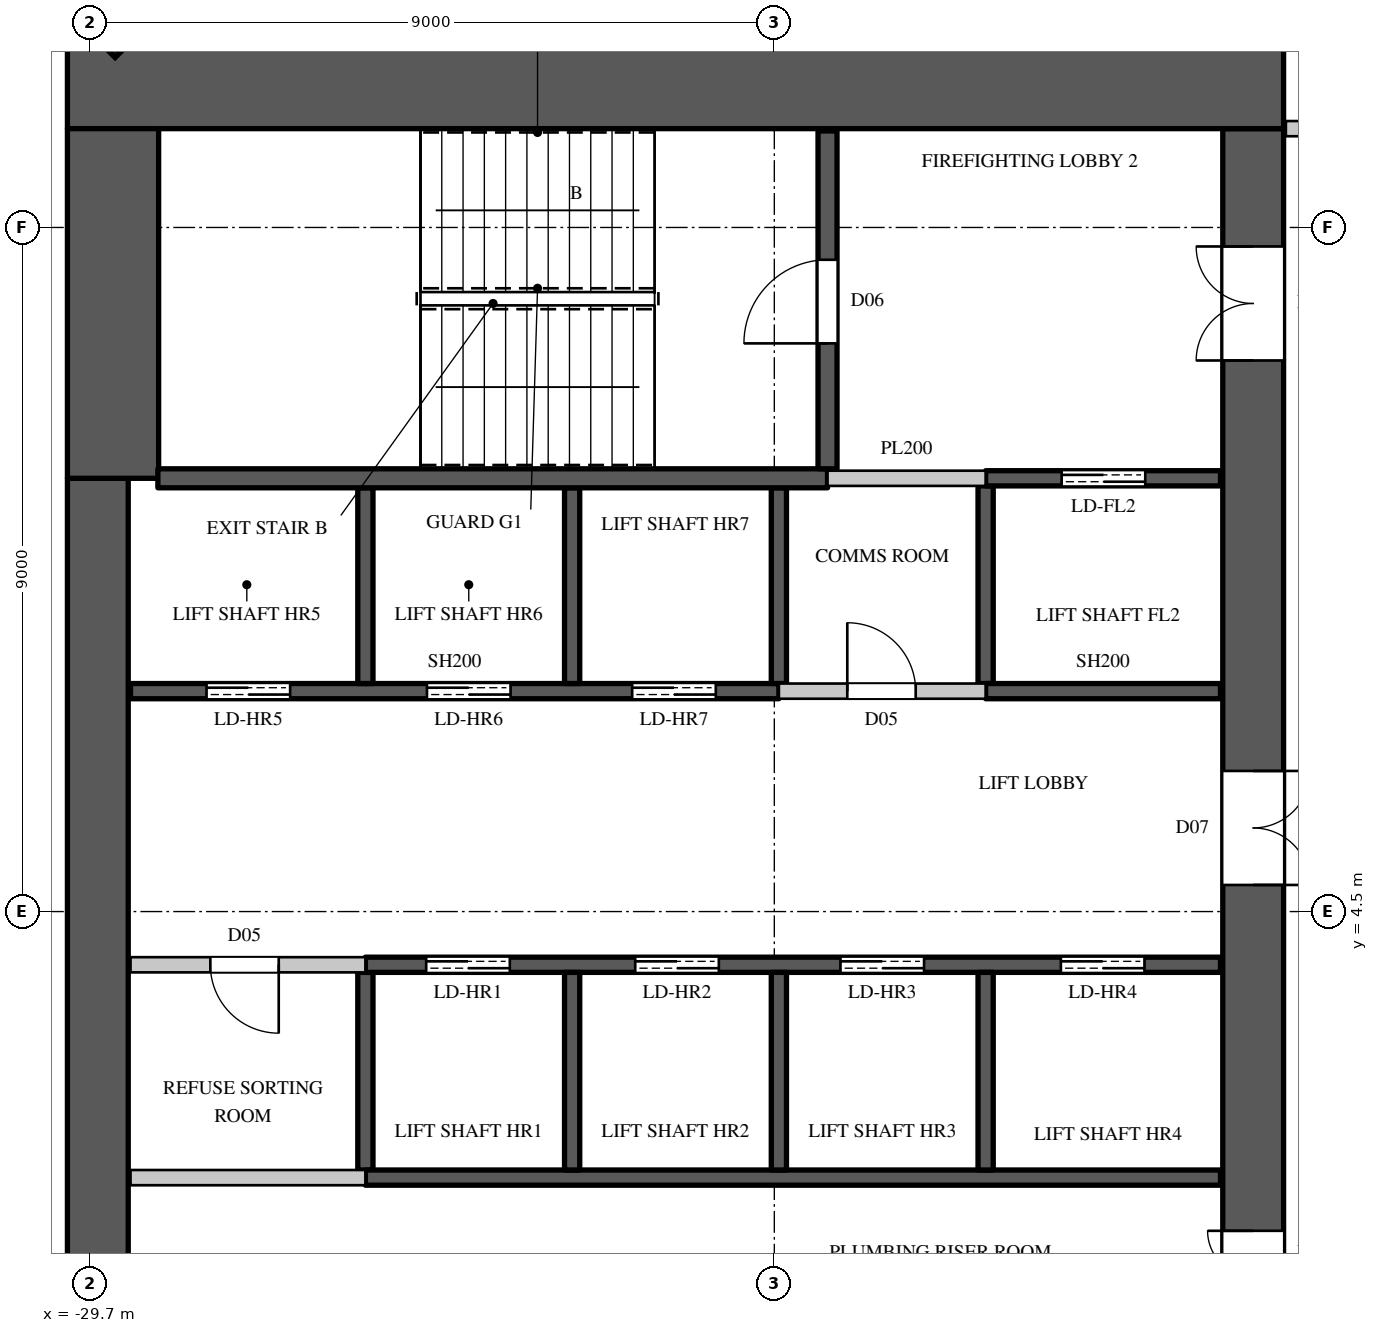
"""IFC4 building model, lengths in metres.
Left out: names, types, materials, properties, quantities, classifications, styles, units other than length and angle.
Written with IfcOpenShell. Run it as: python <this file> out.ifc"""

import sys

from ifc_helpers import new_model, si_unit, direction, frame, frame_2d, origin, origin_2d, place, context, subcontext, project, spatial, rectangle, extrude, element, fill, save


model = new_model("IFC4")
c1 = context("Model", 3, precision=1e-05, world=origin(), true_north=direction((0.0, 1.0)))
c2 = subcontext(c1, "Body", "Model", "MODEL_VIEW")
j1 = project(units=[si_unit("LENGTHUNIT", "METRE"), si_unit("PLANEANGLEUNIT", "RADIAN")], contexts=[c1])
p1 = place(None, origin())
s1 = spatial("IfcSite", under=j1, at=p1, CompositionType="ELEMENT")
p2 = place(p1, origin())
s2 = spatial("IfcBuilding", under=s1, at=p2, CompositionType="ELEMENT")
p3 = place(p2, frame((0.0, 0.0, 172.8)))
s3 = spatial("IfcBuildingStorey", under=s2, at=p3, CompositionType="ELEMENT", Elevation=172.8)
p4 = place(p3, frame((-29.443, 16.443, 0.0), z_axis=(0.0, 0.0, 1.0), x_axis=(-0.707106781187, -0.707106781187, 0.0)))
e1 = element("IfcColumn", 1, at=p4, inside=s3, PredefinedType="COLUMN", context=c2, shape_type="SweptSolid", body=[
    extrude(rectangle(XDim=0.9, YDim=1.1, at=origin_2d()), origin(), (0.0, 0.0, 1.0), 4.1),
])
p5 = place(p3, frame((-30.0, 15.4, 0.0), z_axis=(0.0, 0.0, 1.0), x_axis=(1.0, 0.0, 0.0)))
e2 = element("IfcWall", 2, at=p5, inside=s3, PredefinedType="SHEAR", context=c2, shape_type="SweptSolid", body=[
    extrude(rectangle(XDim=16.0, YDim=1.2, at=frame_2d((8.0, 0.0))), origin(), (0.0, 0.0, 1.0), 4.1),
])
p6 = place(p3, frame((-14.4, -14.8, 0.0), z_axis=(0.0, 0.0, 1.0), x_axis=(0.0, 1.0, 0.0)))
e3 = element("IfcWall", 3, at=p6, inside=s3, PredefinedType="SHEAR", context=c2, shape_type="SweptSolid", body=[
    extrude(rectangle(XDim=29.6, YDim=0.8, at=frame_2d((14.8, 0.0))), origin(), (0.0, 0.0, 1.0), 4.1),
])
p7 = place(p6, frame((1.55, 0.0, 0.0)))
e4 = element("IfcOpeningElement", 4, at=p7, cuts=e3, PredefinedType="OPENING", context=c2, shape_type="SweptSolid", body=[
    extrude(rectangle(XDim=1.5, YDim=2.4, at=frame_2d((0.75, 1.2))), frame((0.0, 0.41, 0.0), z_axis=(0.0, -1.0, 0.0), x_axis=(1.0, 0.0, 0.0)), (0.0, 0.0, 1.0), 0.82),
])
p8 = place(p6, frame((26.55, 0.0, 0.0)))
e5 = element("IfcOpeningElement", 5, at=p8, cuts=e3, PredefinedType="OPENING", context=c2, shape_type="SweptSolid", body=[
    extrude(rectangle(XDim=1.5, YDim=2.4, at=frame_2d((0.75, 1.2))), frame((0.0, 0.41, 0.0), z_axis=(0.0, -1.0, 0.0), x_axis=(1.0, 0.0, 0.0)), (0.0, 0.0, 1.0), 0.82),
])
p9 = place(p6, frame((8.45, 0.0, 0.0)))
e6 = element("IfcOpeningElement", 6, at=p9, cuts=e3, PredefinedType="OPENING", context=c2, shape_type="SweptSolid", body=[
    extrude(rectangle(XDim=1.5, YDim=2.4, at=frame_2d((0.75, 1.2))), frame((0.0, 0.41, 0.0), z_axis=(0.0, -1.0, 0.0), x_axis=(1.0, 0.0, 0.0)), (0.0, 0.0, 1.0), 0.82),
])
p10 = place(p6, frame((19.65, 0.0, 0.0)))
e7 = element("IfcOpeningElement", 7, at=p10, cuts=e3, PredefinedType="OPENING", context=c2, shape_type="SweptSolid", body=[
    extrude(rectangle(XDim=1.5, YDim=2.4, at=frame_2d((0.75, 1.2))), frame((0.0, 0.41, 0.0), z_axis=(0.0, -1.0, 0.0), x_axis=(1.0, 0.0, 0.0)), (0.0, 0.0, 1.0), 0.82),
])
p11 = place(p6, frame((14.5, 0.0, 0.0)))
e8 = element("IfcOpeningElement", 8, at=p11, cuts=e3, PredefinedType="OPENING", context=c2, shape_type="SweptSolid", body=[
    extrude(rectangle(XDim=0.6, YDim=2.0, at=frame_2d((0.3, 1.0))), frame((0.0, 0.41, 0.0), z_axis=(0.0, -1.0, 0.0), x_axis=(1.0, 0.0, 0.0)), (0.0, 0.0, 1.0), 0.82),
])
p12 = place(p3, frame((-29.6, -10.2, 0.0), z_axis=(0.0, 0.0, 1.0), x_axis=(0.0, 1.0, 0.0)))
e9 = element("IfcWall", 9, at=p12, inside=s3, PredefinedType="SHEAR", context=c2, shape_type="SweptSolid", body=[
    extrude(rectangle(XDim=20.4, YDim=0.8, at=frame_2d((10.2, 0.0))), origin(), (0.0, 0.0, 1.0), 4.1),
])
p13 = place(p3, frame((-29.4, 10.2, 0.0), z_axis=(0.0, 0.0, 1.0), x_axis=(0.0, 1.0, 0.0)))
e10 = element("IfcWall", 10, at=p13, inside=s3, PredefinedType="SHEAR", context=c2, shape_type="SweptSolid", body=[
    extrude(rectangle(XDim=4.6, YDim=1.2, at=frame_2d((2.3, 0.0))), origin(), (0.0, 0.0, 1.0), 4.1),
])
p14 = place(p3, frame((-29.17, 3.8, 0.0), z_axis=(0.0, 0.0, 1.0), x_axis=(1.0, 0.0, 0.0)))
e11 = element("IfcWall", 11, at=p14, inside=s3, PredefinedType="PARTITIONING", context=c2, shape_type="SweptSolid", body=[
    extrude(rectangle(XDim=3.09, YDim=0.2, at=frame_2d((1.545, 0.0))), origin(), (0.0, 0.0, 1.0), 3.8),
])
p15 = place(p14, frame((1.05, 0.0, 0.0)))
e12 = element("IfcOpeningElement", 12, at=p15, cuts=e11, PredefinedType="OPENING", context=c2, shape_type="SweptSolid", body=[
    extrude(rectangle(XDim=0.9, YDim=2.2, at=frame_2d((0.45, 1.1))), frame((0.0, 0.11, 0.0), z_axis=(0.0, -1.0, 0.0), x_axis=(1.0, 0.0, 0.0)), (0.0, 0.0, 1.0), 0.22),
])
p16 = place(p3, frame((-13.97, 14.8, 0.0), z_axis=(0.0, 0.0, 1.0), x_axis=(1.0, 0.0, 0.0)))
e13 = element("IfcWall", 13, at=p16, inside=s3, PredefinedType="PARTITIONING", context=c2, shape_type="SweptSolid", body=[
    extrude(rectangle(XDim=2.87, YDim=0.2, at=frame_2d((1.435, 0.0))), origin(), (0.0, 0.0, 1.0), 3.8),
])
p17 = place(p3, frame((-29.17, 1.0, 0.0), z_axis=(0.0, 0.0, 1.0), x_axis=(1.0, 0.0, 0.0)))
e14 = element("IfcWall", 14, at=p17, inside=s3, PredefinedType="PARTITIONING", context=c2, shape_type="SweptSolid", body=[
    extrude(rectangle(XDim=3.09, YDim=0.2, at=frame_2d((1.545, 0.0))), origin(), (0.0, 0.0, 1.0), 3.8),
])
p18 = place(p3, frame((-20.64, 7.4, 0.0), z_axis=(0.0, 0.0, 1.0), x_axis=(1.0, 0.0, 0.0)))
e15 = element("IfcWall", 15, at=p18, inside=s3, PredefinedType="PARTITIONING", context=c2, shape_type="SweptSolid", body=[
    extrude(rectangle(XDim=2.72, YDim=0.2, at=frame_2d((1.36, 0.0))), origin(), (0.0, 0.0, 1.0), 3.8),
])
p19 = place(p18, frame((0.9, 0.0, 0.0)))
e16 = element("IfcOpeningElement", 16, at=p19, cuts=e15, PredefinedType="OPENING", context=c2, shape_type="SweptSolid", body=[
    extrude(rectangle(XDim=0.9, YDim=2.2, at=frame_2d((0.45, 1.1))), frame((0.0, 0.11, 0.0), z_axis=(0.0, -1.0, 0.0), x_axis=(1.0, 0.0, 0.0)), (0.0, 0.0, 1.0), 0.22),
])
p20 = place(p3, frame((-20.0, 10.2, 0.0), z_axis=(0.0, 0.0, 1.0), x_axis=(1.0, 0.0, 0.0)))
e17 = element("IfcWall", 17, at=p20, inside=s3, PredefinedType="PARTITIONING", context=c2, shape_type="SweptSolid", body=[
    extrude(rectangle(XDim=2.08, YDim=0.2, at=frame_2d((1.04, 0.0))), origin(), (0.0, 0.0, 1.0), 3.8),
])
p21 = place(p3, frame((-29.17, 7.4, 0.0), z_axis=(0.0, 0.0, 1.0), x_axis=(1.0, 0.0, 0.0)))
e18 = element("IfcWall", 18, at=p21, inside=s3, PredefinedType="SHEAR", context=c2, shape_type="SweptSolid", body=[
    extrude(rectangle(XDim=8.53, YDim=0.2, at=frame_2d((4.265, 0.0))), origin(), (0.0, 0.0, 1.0), 3.8),
])
p22 = place(p21, frame((1.0, 0.0, 0.0)))
e19 = element("IfcOpeningElement", 19, at=p22, cuts=e18, PredefinedType="OPENING", context=c2, shape_type="SweptSolid", body=[
    extrude(rectangle(XDim=1.1, YDim=2.2, at=frame_2d((0.55, 1.1))), frame((0.0, 0.11, 0.0), z_axis=(0.0, -1.0, 0.0), x_axis=(1.0, 0.0, 0.0)), (0.0, 0.0, 1.0), 0.22),
])
p23 = place(p21, frame((3.9, 0.0, 0.0)))
e20 = element("IfcOpeningElement", 20, at=p23, cuts=e18, PredefinedType="OPENING", context=c2, shape_type="SweptSolid", body=[
    extrude(rectangle(XDim=1.1, YDim=2.2, at=frame_2d((0.55, 1.1))), frame((0.0, 0.11, 0.0), z_axis=(0.0, -1.0, 0.0), x_axis=(1.0, 0.0, 0.0)), (0.0, 0.0, 1.0), 0.22),
])
p24 = place(p21, frame((6.6, 0.0, 0.0)))
e21 = element("IfcOpeningElement", 21, at=p24, cuts=e18, PredefinedType="OPENING", context=c2, shape_type="SweptSolid", body=[
    extrude(rectangle(XDim=1.1, YDim=2.2, at=frame_2d((0.55, 1.1))), frame((0.0, 0.11, 0.0), z_axis=(0.0, -1.0, 0.0), x_axis=(1.0, 0.0, 0.0)), (0.0, 0.0, 1.0), 0.22),
])
p25 = place(p3, frame((-26.08, 1.1, 0.0), z_axis=(0.0, 0.0, 1.0), x_axis=(0.0, 1.0, 0.0)))
e22 = element("IfcWall", 22, at=p25, inside=s3, PredefinedType="SHEAR", context=c2, shape_type="SweptSolid", body=[
    extrude(rectangle(XDim=2.6, YDim=0.2, at=frame_2d((1.3, 0.0))), origin(), (0.0, 0.0, 1.0), 3.8),
])
p26 = place(p3, frame((-26.08, 1.0, 0.0), z_axis=(0.0, 0.0, 1.0), x_axis=(1.0, 0.0, 0.0)))
e23 = element("IfcWall", 23, at=p26, inside=s3, PredefinedType="SHEAR", context=c2, shape_type="SweptSolid", body=[
    extrude(rectangle(XDim=11.25, YDim=0.2, at=frame_2d((5.625, 0.0))), origin(), (0.0, 0.0, 1.0), 3.8),
])
p27 = place(p3, frame((-26.08, 3.8, 0.0), z_axis=(0.0, 0.0, 1.0), x_axis=(1.0, 0.0, 0.0)))
e24 = element("IfcWall", 24, at=p27, inside=s3, PredefinedType="SHEAR", context=c2, shape_type="SweptSolid", body=[
    extrude(rectangle(XDim=11.25, YDim=0.2, at=frame_2d((5.625, 0.0))), origin(), (0.0, 0.0, 1.0), 3.8),
])
p28 = place(p27, frame((0.8, 0.0, 0.0)))
e25 = element("IfcOpeningElement", 25, at=p28, cuts=e24, PredefinedType="OPENING", context=c2, shape_type="SweptSolid", body=[
    extrude(rectangle(XDim=1.1, YDim=2.2, at=frame_2d((0.55, 1.1))), frame((0.0, 0.11, 0.0), z_axis=(0.0, -1.0, 0.0), x_axis=(1.0, 0.0, 0.0)), (0.0, 0.0, 1.0), 0.22),
])
p29 = place(p27, frame((3.55, 0.0, 0.0)))
e26 = element("IfcOpeningElement", 26, at=p29, cuts=e24, PredefinedType="OPENING", context=c2, shape_type="SweptSolid", body=[
    extrude(rectangle(XDim=1.1, YDim=2.2, at=frame_2d((0.55, 1.1))), frame((0.0, 0.11, 0.0), z_axis=(0.0, -1.0, 0.0), x_axis=(1.0, 0.0, 0.0)), (0.0, 0.0, 1.0), 0.22),
])
p30 = place(p27, frame((6.25, 0.0, 0.0)))
e27 = element("IfcOpeningElement", 27, at=p30, cuts=e24, PredefinedType="OPENING", context=c2, shape_type="SweptSolid", body=[
    extrude(rectangle(XDim=1.1, YDim=2.2, at=frame_2d((0.55, 1.1))), frame((0.0, 0.11, 0.0), z_axis=(0.0, -1.0, 0.0), x_axis=(1.0, 0.0, 0.0)), (0.0, 0.0, 1.0), 0.22),
])
p31 = place(p27, frame((9.15, 0.0, 0.0)))
e28 = element("IfcOpeningElement", 28, at=p31, cuts=e24, PredefinedType="OPENING", context=c2, shape_type="SweptSolid", body=[
    extrude(rectangle(XDim=1.1, YDim=2.2, at=frame_2d((0.55, 1.1))), frame((0.0, 0.11, 0.0), z_axis=(0.0, -1.0, 0.0), x_axis=(1.0, 0.0, 0.0)), (0.0, 0.0, 1.0), 0.22),
])
p32 = place(p3, frame((-26.08, 7.5, 0.0), z_axis=(0.0, 0.0, 1.0), x_axis=(0.0, 1.0, 0.0)))
e29 = element("IfcWall", 29, at=p32, inside=s3, PredefinedType="SHEAR", context=c2, shape_type="SweptSolid", body=[
    extrude(rectangle(XDim=2.575, YDim=0.2, at=frame_2d((1.288, 0.0))), origin(), (0.0, 0.0, 1.0), 4.1),
])
p33 = place(p3, frame((-23.36, 1.1, 0.0), z_axis=(0.0, 0.0, 1.0), x_axis=(0.0, 1.0, 0.0)))
e30 = element("IfcWall", 30, at=p33, inside=s3, PredefinedType="SHEAR", context=c2, shape_type="SweptSolid", body=[
    extrude(rectangle(XDim=2.6, YDim=0.2, at=frame_2d((1.3, 0.0))), origin(), (0.0, 0.0, 1.0), 4.1),
])
p34 = place(p3, frame((-23.36, 7.5, 0.0), z_axis=(0.0, 0.0, 1.0), x_axis=(0.0, 1.0, 0.0)))
e31 = element("IfcWall", 31, at=p34, inside=s3, PredefinedType="SHEAR", context=c2, shape_type="SweptSolid", body=[
    extrude(rectangle(XDim=2.575, YDim=0.2, at=frame_2d((1.288, 0.0))), origin(), (0.0, 0.0, 1.0), 4.1),
])
p35 = place(p3, frame((-20.64, 1.1, 0.0), z_axis=(0.0, 0.0, 1.0), x_axis=(0.0, 1.0, 0.0)))
e32 = element("IfcWall", 32, at=p35, inside=s3, PredefinedType="SHEAR", context=c2, shape_type="SweptSolid", body=[
    extrude(rectangle(XDim=2.6, YDim=0.2, at=frame_2d((1.3, 0.0))), origin(), (0.0, 0.0, 1.0), 4.1),
])
p36 = place(p3, frame((-20.64, 7.5, 0.0), z_axis=(0.0, 0.0, 1.0), x_axis=(0.0, 1.0, 0.0)))
e33 = element("IfcWall", 33, at=p36, inside=s3, PredefinedType="SHEAR", context=c2, shape_type="SweptSolid", body=[
    extrude(rectangle(XDim=2.575, YDim=0.2, at=frame_2d((1.288, 0.0))), origin(), (0.0, 0.0, 1.0), 3.8),
])
p37 = place(p3, frame((-17.92, 1.1, 0.0), z_axis=(0.0, 0.0, 1.0), x_axis=(0.0, 1.0, 0.0)))
e34 = element("IfcWall", 34, at=p37, inside=s3, PredefinedType="SHEAR", context=c2, shape_type="SweptSolid", body=[
    extrude(rectangle(XDim=2.6, YDim=0.2, at=frame_2d((1.3, 0.0))), origin(), (0.0, 0.0, 1.0), 4.1),
])
p38 = place(p3, frame((-17.92, 7.5, 0.0), z_axis=(0.0, 0.0, 1.0), x_axis=(0.0, 1.0, 0.0)))
e35 = element("IfcWall", 35, at=p38, inside=s3, PredefinedType="SHEAR", context=c2, shape_type="SweptSolid", body=[
    extrude(rectangle(XDim=2.6, YDim=0.2, at=frame_2d((1.3, 0.0))), origin(), (0.0, 0.0, 1.0), 3.8),
])
p39 = place(p3, frame((-17.92, 7.4, 0.0), z_axis=(0.0, 0.0, 1.0), x_axis=(1.0, 0.0, 0.0)))
e36 = element("IfcWall", 36, at=p39, inside=s3, PredefinedType="SHEAR", context=c2, shape_type="SweptSolid", body=[
    extrude(rectangle(XDim=3.09, YDim=0.2, at=frame_2d((1.545, 0.0))), origin(), (0.0, 0.0, 1.0), 3.8),
])
p40 = place(p3, frame((-17.92, 10.2, 0.0), z_axis=(0.0, 0.0, 1.0), x_axis=(1.0, 0.0, 0.0)))
e37 = element("IfcWall", 37, at=p40, inside=s3, PredefinedType="SHEAR", context=c2, shape_type="SweptSolid", body=[
    extrude(rectangle(XDim=3.09, YDim=0.2, at=frame_2d((1.545, 0.0))), origin(), (0.0, 0.0, 1.0), 3.8),
])
p41 = place(p40, frame((1.0, 0.0, 0.0)))
e38 = element("IfcOpeningElement", 38, at=p41, cuts=e37, PredefinedType="OPENING", context=c2, shape_type="SweptSolid", body=[
    extrude(rectangle(XDim=1.1, YDim=2.2, at=frame_2d((0.55, 1.1))), frame((0.0, 0.11, 0.0), z_axis=(0.0, -1.0, 0.0), x_axis=(1.0, 0.0, 0.0)), (0.0, 0.0, 1.0), 0.22),
])
p42 = place(p3, frame((-28.81, 10.2, 0.0), z_axis=(0.0, 0.0, 1.0), x_axis=(1.0, 0.0, 0.0)))
e39 = element("IfcWall", 39, at=p42, inside=s3, PredefinedType="SHEAR", context=c2, shape_type="SweptSolid", body=[
    extrude(rectangle(XDim=8.81, YDim=0.25, at=frame_2d((4.405, 0.0))), origin(), (0.0, 0.0, 1.0), 3.8),
])
p43 = place(p3, frame((-20.0, 10.325, 0.0), z_axis=(0.0, 0.0, 1.0), x_axis=(0.0, 1.0, 0.0)))
e40 = element("IfcWall", 40, at=p43, inside=s3, PredefinedType="SHEAR", context=c2, shape_type="SweptSolid", body=[
    extrude(rectangle(XDim=4.445, YDim=0.25, at=frame_2d((2.223, 0.0))), origin(), (0.0, 0.0, 1.0), 3.8),
])
p44 = place(p43, frame((1.65, 0.0, 0.0)))
e41 = element("IfcOpeningElement", 41, at=p44, cuts=e40, PredefinedType="OPENING", context=c2, shape_type="SweptSolid", body=[
    extrude(rectangle(XDim=1.1, YDim=2.2, at=frame_2d((0.55, 1.1))), frame((0.0, 0.135, 0.0), z_axis=(0.0, -1.0, 0.0), x_axis=(1.0, 0.0, 0.0)), (0.0, 0.0, 1.0), 0.27),
])
p45 = place(p44, origin())
e42 = element("IfcDoor", 42, at=p45, inside=s3, OperationType="SINGLE_SWING_LEFT", PredefinedType="DOOR", context=c2, shape_type="SweptSolid", body=[
    extrude(rectangle(XDim=1.1, YDim=2.2, at=frame_2d((0.55, 1.1))), frame((0.0, 0.025, 0.0), z_axis=(0.0, -1.0, 0.0), x_axis=(1.0, 0.0, 0.0)), (0.0, 0.0, 1.0), 0.05),
])
fill(e41, e42)
p46 = place(p15, origin())
e43 = element("IfcDoor", 43, at=p46, inside=s3, OperationType="SINGLE_SWING_LEFT", PredefinedType="DOOR", context=c2, shape_type="SweptSolid", body=[
    extrude(rectangle(XDim=0.9, YDim=2.2, at=frame_2d((0.45, 1.1))), frame((0.0, 0.025, 0.0), z_axis=(0.0, -1.0, 0.0), x_axis=(1.0, 0.0, 0.0)), (0.0, 0.0, 1.0), 0.05),
])
fill(e12, e43)
p47 = place(p19, origin())
e44 = element("IfcDoor", 44, at=p47, inside=s3, OperationType="SINGLE_SWING_LEFT", PredefinedType="DOOR", context=c2, shape_type="SweptSolid", body=[
    extrude(rectangle(XDim=0.9, YDim=2.2, at=frame_2d((0.45, 1.1))), frame((0.0, 0.025, 0.0), z_axis=(0.0, -1.0, 0.0), x_axis=(1.0, 0.0, 0.0)), (0.0, 0.0, 1.0), 0.05),
])
fill(e16, e44)
p48 = place(p28, origin())
e45 = element("IfcDoor", 45, at=p48, inside=s3, OperationType="DOUBLE_DOOR_SLIDING", PredefinedType="DOOR", context=c2, shape_type="SweptSolid", body=[
    extrude(rectangle(XDim=1.1, YDim=2.2, at=frame_2d((0.55, 1.1))), frame((0.0, 0.025, 0.0), z_axis=(0.0, -1.0, 0.0), x_axis=(1.0, 0.0, 0.0)), (0.0, 0.0, 1.0), 0.05),
])
fill(e25, e45)
p49 = place(p29, origin())
e46 = element("IfcDoor", 46, at=p49, inside=s3, OperationType="DOUBLE_DOOR_SLIDING", PredefinedType="DOOR", context=c2, shape_type="SweptSolid", body=[
    extrude(rectangle(XDim=1.1, YDim=2.2, at=frame_2d((0.55, 1.1))), frame((0.0, 0.025, 0.0), z_axis=(0.0, -1.0, 0.0), x_axis=(1.0, 0.0, 0.0)), (0.0, 0.0, 1.0), 0.05),
])
fill(e26, e46)
p50 = place(p30, origin())
e47 = element("IfcDoor", 47, at=p50, inside=s3, OperationType="DOUBLE_DOOR_SLIDING", PredefinedType="DOOR", context=c2, shape_type="SweptSolid", body=[
    extrude(rectangle(XDim=1.1, YDim=2.2, at=frame_2d((0.55, 1.1))), frame((0.0, 0.025, 0.0), z_axis=(0.0, -1.0, 0.0), x_axis=(1.0, 0.0, 0.0)), (0.0, 0.0, 1.0), 0.05),
])
fill(e27, e47)
p51 = place(p31, origin())
e48 = element("IfcDoor", 48, at=p51, inside=s3, OperationType="DOUBLE_DOOR_SLIDING", PredefinedType="DOOR", context=c2, shape_type="SweptSolid", body=[
    extrude(rectangle(XDim=1.1, YDim=2.2, at=frame_2d((0.55, 1.1))), frame((0.0, 0.025, 0.0), z_axis=(0.0, -1.0, 0.0), x_axis=(1.0, 0.0, 0.0)), (0.0, 0.0, 1.0), 0.05),
])
fill(e28, e48)
p52 = place(p22, origin())
e49 = element("IfcDoor", 49, at=p52, inside=s3, OperationType="DOUBLE_DOOR_SLIDING", PredefinedType="DOOR", context=c2, shape_type="SweptSolid", body=[
    extrude(rectangle(XDim=1.1, YDim=2.2, at=frame_2d((0.55, 1.1))), frame((0.0, 0.025, 0.0), z_axis=(0.0, -1.0, 0.0), x_axis=(1.0, 0.0, 0.0)), (0.0, 0.0, 1.0), 0.05),
])
fill(e19, e49)
p53 = place(p23, origin())
e50 = element("IfcDoor", 50, at=p53, inside=s3, OperationType="DOUBLE_DOOR_SLIDING", PredefinedType="DOOR", context=c2, shape_type="SweptSolid", body=[
    extrude(rectangle(XDim=1.1, YDim=2.2, at=frame_2d((0.55, 1.1))), frame((0.0, 0.025, 0.0), z_axis=(0.0, -1.0, 0.0), x_axis=(1.0, 0.0, 0.0)), (0.0, 0.0, 1.0), 0.05),
])
fill(e20, e50)
p54 = place(p24, origin())
e51 = element("IfcDoor", 51, at=p54, inside=s3, OperationType="DOUBLE_DOOR_SLIDING", PredefinedType="DOOR", context=c2, shape_type="SweptSolid", body=[
    extrude(rectangle(XDim=1.1, YDim=2.2, at=frame_2d((0.55, 1.1))), frame((0.0, 0.025, 0.0), z_axis=(0.0, -1.0, 0.0), x_axis=(1.0, 0.0, 0.0)), (0.0, 0.0, 1.0), 0.05),
])
fill(e21, e51)
p55 = place(p41, origin())
e52 = element("IfcDoor", 52, at=p55, inside=s3, OperationType="DOUBLE_DOOR_SLIDING", PredefinedType="DOOR", context=c2, shape_type="SweptSolid", body=[
    extrude(rectangle(XDim=1.1, YDim=2.2, at=frame_2d((0.55, 1.1))), frame((0.0, 0.025, 0.0), z_axis=(0.0, -1.0, 0.0), x_axis=(1.0, 0.0, 0.0)), (0.0, 0.0, 1.0), 0.05),
])
fill(e38, e52)
p56 = place(p8, origin())
e53 = element("IfcDoor", 53, at=p56, inside=s3, OperationType="DOUBLE_DOOR_SINGLE_SWING", PredefinedType="DOOR", context=c2, shape_type="SweptSolid", body=[
    extrude(rectangle(XDim=1.5, YDim=2.4, at=frame_2d((0.75, 1.2))), frame((0.0, 0.395, 0.0), z_axis=(0.0, -1.0, 0.0), x_axis=(1.0, 0.0, 0.0)), (0.0, 0.0, 1.0), 0.05),
])
fill(e5, e53)
p57 = place(p10, origin())
e54 = element("IfcDoor", 54, at=p57, inside=s3, OperationType="DOUBLE_DOOR_SINGLE_SWING", PredefinedType="DOOR", context=c2, shape_type="SweptSolid", body=[
    extrude(rectangle(XDim=1.5, YDim=2.4, at=frame_2d((0.75, 1.2))), frame((0.0, -0.345, 0.0), z_axis=(0.0, -1.0, 0.0), x_axis=(1.0, 0.0, 0.0)), (0.0, 0.0, 1.0), 0.05),
])
fill(e7, e54)
p58 = place(p11, origin())
e55 = element("IfcDoor", 55, at=p58, inside=s3, OperationType="SINGLE_SWING_RIGHT", PredefinedType="DOOR", context=c2, shape_type="SweptSolid", body=[
    extrude(rectangle(XDim=0.6, YDim=2.0, at=frame_2d((0.3, 1.0))), frame((0.0, 0.395, 0.0), z_axis=(0.0, -1.0, 0.0), x_axis=(1.0, 0.0, 0.0)), (0.0, 0.0, 1.0), 0.05),
])
fill(e8, e55)
save(model, sys.argv[1])
